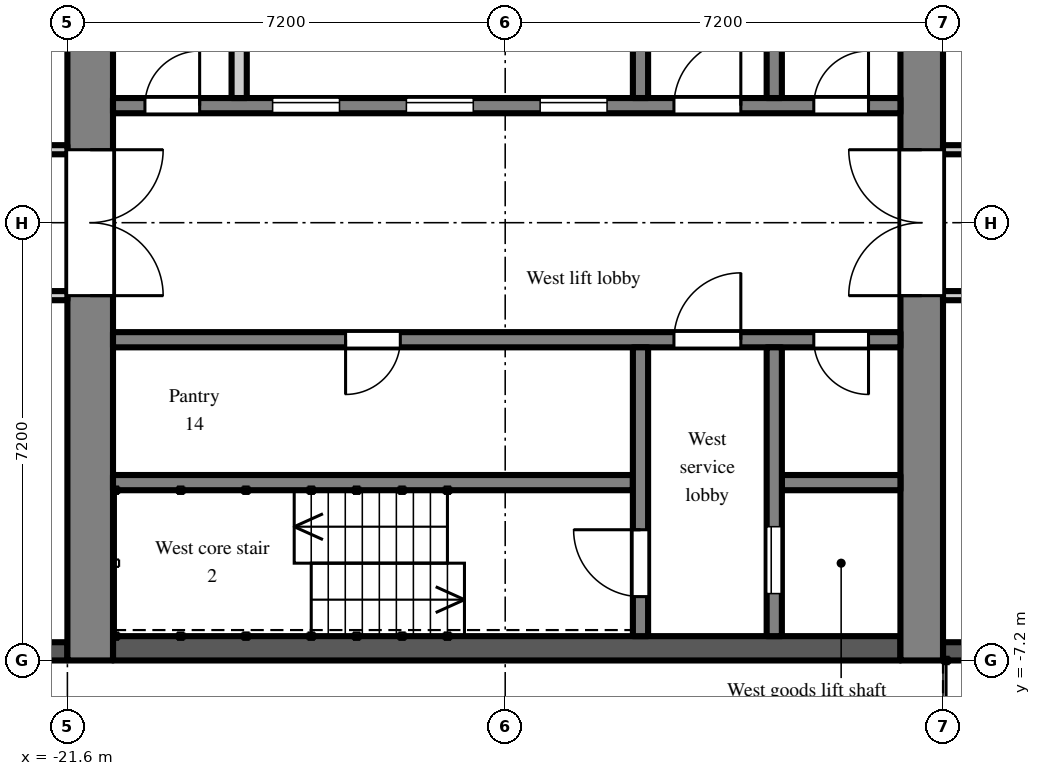
"""IFC4 building model, lengths in metres.
Left out: names, types, materials, properties, quantities, classifications, styles, units other than length and angle.
Written with IfcOpenShell. Run it as: python <this file> out.ifc"""

import sys

from ifc_helpers import new_model, si_unit, direction, frame, frame_2d, origin, place, context, subcontext, project, spatial, rectangle, extrude, element, fill, save


model = new_model("IFC4")
c1 = context("Model", 3, precision=1e-05, world=origin(), true_north=direction((0.0, 1.0)))
c2 = subcontext(c1, "Body", "Model", "MODEL_VIEW")
j1 = project(units=[si_unit("LENGTHUNIT", "METRE"), si_unit("PLANEANGLEUNIT", "RADIAN")], contexts=[c1])
p1 = place(None, origin())
s1 = spatial("IfcSite", under=j1, at=p1, CompositionType="ELEMENT")
p2 = place(p1, origin())
s2 = spatial("IfcBuilding", under=s1, at=p2, CompositionType="ELEMENT")
p3 = place(p2, frame((0.0, 0.0, 191.7)))
s3 = spatial("IfcBuildingStorey", under=s2, at=p3, CompositionType="ELEMENT", Elevation=191.7)
p4 = place(p3, frame((-24.3, -7.05, 0.0), z_axis=(0.0, 0.0, 1.0), x_axis=(1.0, 0.0, 0.0)))
e1 = element("IfcWall", 1, at=p4, inside=s3, PredefinedType="SOLIDWALL", context=c2, shape_type="SweptSolid", body=[
    extrude(rectangle(XDim=2.7, YDim=0.3, at=frame_2d((1.35, 0.0))), origin(), (0.0, 0.0, 1.0), 2.3),
])
p5 = place(p4, frame((0.75, 0.0, 0.2)))
e2 = element("IfcOpeningElement", 2, at=p5, cuts=e1, PredefinedType="OPENING", context=c2, shape_type="SweptSolid", body=[
    extrude(rectangle(XDim=1.2, YDim=1.85, at=frame_2d((0.6, 0.925))), frame((0.0, 0.16, 0.0), z_axis=(0.0, -1.0, 0.0), x_axis=(1.0, 0.0, 0.0)), (0.0, 0.0, 1.0), 0.32),
])
p6 = place(p3, frame((-7.2, -7.05, 0.0), z_axis=(0.0, 0.0, 1.0), x_axis=(1.0, 0.0, 0.0)))
e3 = element("IfcWall", 3, at=p6, inside=s3, PredefinedType="SOLIDWALL", context=c2, shape_type="SweptSolid", body=[
    extrude(rectangle(XDim=3.0, YDim=0.3, at=frame_2d((1.5, 0.0))), origin(), (0.0, 0.0, 1.0), 2.55),
])
p7 = place(p3, frame((-7.55, -7.2, 0.0), z_axis=(0.0, 0.0, 1.0), x_axis=(0.0, 1.0, 0.0)))
e4 = element("IfcWall", 4, at=p7, inside=s3, PredefinedType="SHEAR", context=c2, shape_type="SweptSolid", body=[
    extrude(rectangle(XDim=14.4, YDim=0.7, at=frame_2d((7.2, 0.0))), origin(), (0.0, 0.0, 1.0), 2.55),
])
p8 = place(p7, frame((6.0, 0.0, 0.0)))
e5 = element("IfcOpeningElement", 5, at=p8, cuts=e4, PredefinedType="OPENING", context=c2, shape_type="SweptSolid", body=[
    extrude(rectangle(XDim=2.4, YDim=2.2, at=frame_2d((1.2, 1.1))), frame((0.0, 0.36, 0.0), z_axis=(0.0, -1.0, 0.0), x_axis=(1.0, 0.0, 0.0)), (0.0, 0.0, 1.0), 0.72),
])
p9 = place(p3, frame((-21.225, -7.2, 0.0), z_axis=(0.0, 0.0, 1.0), x_axis=(0.0, 1.0, 0.0)))
e6 = element("IfcWall", 6, at=p9, inside=s3, PredefinedType="SHEAR", context=c2, shape_type="SweptSolid", body=[
    extrude(rectangle(XDim=14.4, YDim=0.75, at=frame_2d((7.2, 0.0))), origin(), (0.0, 0.0, 1.0), 2.55),
])
p10 = place(p9, frame((6.0, 0.0, 0.0)))
e7 = element("IfcOpeningElement", 7, at=p10, cuts=e6, PredefinedType="OPENING", context=c2, shape_type="SweptSolid", body=[
    extrude(rectangle(XDim=2.4, YDim=2.2, at=frame_2d((1.2, 1.1))), frame((0.0, 0.385, 0.0), z_axis=(0.0, -1.0, 0.0), x_axis=(1.0, 0.0, 0.0)), (0.0, 0.0, 1.0), 0.77),
])
p11 = place(p3, frame((-7.9, 1.925, 0.0), z_axis=(0.0, 0.0, 1.0), x_axis=(-1.0, 0.0, 0.0)))
e8 = element("IfcWall", 8, at=p11, inside=s3, PredefinedType="SHEAR", context=c2, shape_type="SweptSolid", body=[
    extrude(rectangle(XDim=12.95, YDim=0.25, at=frame_2d((6.475, 0.0))), origin(), (0.0, 0.0, 1.0), 2.55),
])
p12 = place(p11, frame((4.825, 0.0, 0.0)))
e9 = element("IfcOpeningElement", 9, at=p12, cuts=e8, PredefinedType="OPENING", context=c2, shape_type="SweptSolid", body=[
    extrude(rectangle(XDim=1.1, YDim=2.1, at=frame_2d((0.55, 1.05))), frame((0.0, 0.135, 0.0), z_axis=(0.0, -1.0, 0.0), x_axis=(1.0, 0.0, 0.0)), (0.0, 0.0, 1.0), 0.27),
])
p13 = place(p11, frame((7.025, 0.0, 0.0)))
e10 = element("IfcOpeningElement", 10, at=p13, cuts=e8, PredefinedType="OPENING", context=c2, shape_type="SweptSolid", body=[
    extrude(rectangle(XDim=1.1, YDim=2.1, at=frame_2d((0.55, 1.05))), frame((0.0, 0.135, 0.0), z_axis=(0.0, -1.0, 0.0), x_axis=(1.0, 0.0, 0.0)), (0.0, 0.0, 1.0), 0.27),
])
p14 = place(p11, frame((9.225, 0.0, 0.0)))
e11 = element("IfcOpeningElement", 11, at=p14, cuts=e8, PredefinedType="OPENING", context=c2, shape_type="SweptSolid", body=[
    extrude(rectangle(XDim=1.1, YDim=2.1, at=frame_2d((0.55, 1.05))), frame((0.0, 0.135, 0.0), z_axis=(0.0, -1.0, 0.0), x_axis=(1.0, 0.0, 0.0)), (0.0, 0.0, 1.0), 0.27),
])
p15 = place(p11, frame((0.525, 0.0, 0.0)))
e12 = element("IfcOpeningElement", 12, at=p15, cuts=e8, PredefinedType="OPENING", context=c2, shape_type="SweptSolid", body=[
    extrude(rectangle(XDim=0.9, YDim=2.1, at=frame_2d((0.45, 1.05))), frame((0.0, 0.135, 0.0), z_axis=(0.0, -1.0, 0.0), x_axis=(1.0, 0.0, 0.0)), (0.0, 0.0, 1.0), 0.27),
])
p16 = place(p11, frame((2.625, 0.0, 0.0)))
e13 = element("IfcOpeningElement", 13, at=p16, cuts=e8, PredefinedType="OPENING", context=c2, shape_type="SweptSolid", body=[
    extrude(rectangle(XDim=1.1, YDim=2.1, at=frame_2d((0.55, 1.05))), frame((0.0, 0.135, 0.0), z_axis=(0.0, -1.0, 0.0), x_axis=(1.0, 0.0, 0.0)), (0.0, 0.0, 1.0), 0.27),
])
p17 = place(p11, frame((11.525, 0.0, 0.0)))
e14 = element("IfcOpeningElement", 14, at=p17, cuts=e8, PredefinedType="OPENING", context=c2, shape_type="SweptSolid", body=[
    extrude(rectangle(XDim=0.9, YDim=2.1, at=frame_2d((0.45, 1.05))), frame((0.0, 0.135, 0.0), z_axis=(0.0, -1.0, 0.0), x_axis=(1.0, 0.0, 0.0)), (0.0, 0.0, 1.0), 0.27),
])
p18 = place(p3, frame((-9.975, 2.05, 0.0), z_axis=(0.0, 0.0, 1.0), x_axis=(0.0, 1.0, 0.0)))
e15 = element("IfcWall", 15, at=p18, inside=s3, PredefinedType="SHEAR", context=c2, shape_type="SweptSolid", body=[
    extrude(rectangle(XDim=4.75, YDim=0.25, at=frame_2d((2.375, 0.0))), origin(), (0.0, 0.0, 1.0), 2.55),
])
p19 = place(p18, frame((2.95, 0.0, 0.0)))
e16 = element("IfcOpeningElement", 16, at=p19, cuts=e15, PredefinedType="OPENING", context=c2, shape_type="SweptSolid", body=[
    extrude(rectangle(XDim=1.1, YDim=2.1, at=frame_2d((0.55, 1.05))), frame((0.0, 0.135, 0.0), z_axis=(0.0, -1.0, 0.0), x_axis=(1.0, 0.0, 0.0)), (0.0, 0.0, 1.0), 0.27),
])
p20 = place(p3, frame((-12.175, 2.05, 0.0), z_axis=(0.0, 0.0, 1.0), x_axis=(0.0, 1.0, 0.0)))
e17 = element("IfcWall", 17, at=p20, inside=s3, PredefinedType="SHEAR", context=c2, shape_type="SweptSolid", body=[
    extrude(rectangle(XDim=4.75, YDim=0.25, at=frame_2d((2.375, 0.0))), origin(), (0.0, 0.0, 1.0), 2.55),
])
p21 = place(p20, frame((3.0, 0.0, 0.0)))
e18 = element("IfcOpeningElement", 18, at=p21, cuts=e17, PredefinedType="OPENING", context=c2, shape_type="SweptSolid", body=[
    extrude(rectangle(XDim=1.1, YDim=2.1, at=frame_2d((0.55, 1.05))), frame((0.0, 0.135, 0.0), z_axis=(0.0, -1.0, 0.0), x_axis=(1.0, 0.0, 0.0)), (0.0, 0.0, 1.0), 0.27),
])
p22 = place(p3, frame((-18.775, 2.05, 0.0), z_axis=(0.0, 0.0, 1.0), x_axis=(0.0, 1.0, 0.0)))
e19 = element("IfcWall", 19, at=p22, inside=s3, PredefinedType="PARTITIONING", context=c2, shape_type="SweptSolid", body=[
    extrude(rectangle(XDim=2.1, YDim=0.25, at=frame_2d((1.05, 0.0))), origin(), (0.0, 0.0, 1.0), 2.55),
])
p23 = place(p3, frame((-7.9, -7.0, 0.0), z_axis=(0.0, 0.0, 1.0), x_axis=(-1.0, 0.0, 0.0)))
e20 = element("IfcWall", 20, at=p23, inside=s3, PredefinedType="SHEAR", context=c2, shape_type="SweptSolid", body=[
    extrude(rectangle(XDim=12.95, YDim=0.4, at=frame_2d((6.475, 0.0))), origin(), (0.0, 0.0, 1.0), 2.55),
])
p24 = place(p3, frame((-7.9, -1.925, 0.0), z_axis=(0.0, 0.0, 1.0), x_axis=(-1.0, 0.0, 0.0)))
e21 = element("IfcWall", 21, at=p24, inside=s3, PredefinedType="SHEAR", context=c2, shape_type="SweptSolid", body=[
    extrude(rectangle(XDim=12.95, YDim=0.25, at=frame_2d((6.475, 0.0))), origin(), (0.0, 0.0, 1.0), 2.55),
])
p25 = place(p24, frame((0.525, 0.0, 0.0)))
e22 = element("IfcOpeningElement", 22, at=p25, cuts=e21, PredefinedType="OPENING", context=c2, shape_type="SweptSolid", body=[
    extrude(rectangle(XDim=0.9, YDim=2.1, at=frame_2d((0.45, 1.05))), frame((0.0, 0.135, 0.0), z_axis=(0.0, -1.0, 0.0), x_axis=(1.0, 0.0, 0.0)), (0.0, 0.0, 1.0), 0.27),
])
p26 = place(p24, frame((2.625, 0.0, 0.0)))
e23 = element("IfcOpeningElement", 23, at=p26, cuts=e21, PredefinedType="OPENING", context=c2, shape_type="SweptSolid", body=[
    extrude(rectangle(XDim=1.1, YDim=2.1, at=frame_2d((0.55, 1.05))), frame((0.0, 0.135, 0.0), z_axis=(0.0, -1.0, 0.0), x_axis=(1.0, 0.0, 0.0)), (0.0, 0.0, 1.0), 0.27),
])
p27 = place(p24, frame((8.225, 0.0, 0.0)))
e24 = element("IfcOpeningElement", 24, at=p27, cuts=e21, PredefinedType="OPENING", context=c2, shape_type="SweptSolid", body=[
    extrude(rectangle(XDim=0.9, YDim=2.1, at=frame_2d((0.45, 1.05))), frame((0.0, 0.135, 0.0), z_axis=(0.0, -1.0, 0.0), x_axis=(1.0, 0.0, 0.0)), (0.0, 0.0, 1.0), 0.27),
])
p28 = place(p3, frame((-7.9, -4.275, 0.0), z_axis=(0.0, 0.0, 1.0), x_axis=(-1.0, 0.0, 0.0)))
e25 = element("IfcWall", 25, at=p28, inside=s3, PredefinedType="SHEAR", context=c2, shape_type="SweptSolid", body=[
    extrude(rectangle(XDim=1.95, YDim=0.25, at=frame_2d((0.975, 0.0))), origin(), (0.0, 0.0, 1.0), 2.55),
])
p29 = place(p3, frame((-12.3, -4.275, 0.0), z_axis=(0.0, 0.0, 1.0), x_axis=(-1.0, 0.0, 0.0)))
e26 = element("IfcWall", 26, at=p29, inside=s3, PredefinedType="SHEAR", context=c2, shape_type="SweptSolid", body=[
    extrude(rectangle(XDim=8.55, YDim=0.25, at=frame_2d((4.275, 0.0))), origin(), (0.0, 0.0, 1.0), 2.55),
])
p30 = place(p3, frame((-9.975, -2.05, 0.0), z_axis=(0.0, 0.0, 1.0), x_axis=(0.0, -1.0, 0.0)))
e27 = element("IfcWall", 27, at=p30, inside=s3, PredefinedType="SHEAR", context=c2, shape_type="SweptSolid", body=[
    extrude(rectangle(XDim=4.75, YDim=0.25, at=frame_2d((2.375, 0.0))), origin(), (0.0, 0.0, 1.0), 2.55),
])
p31 = place(p30, frame((2.95, 0.0, 0.0)))
e28 = element("IfcOpeningElement", 28, at=p31, cuts=e27, PredefinedType="OPENING", context=c2, shape_type="SweptSolid", body=[
    extrude(rectangle(XDim=1.1, YDim=2.1, at=frame_2d((0.55, 1.05))), frame((0.0, 0.135, 0.0), z_axis=(0.0, -1.0, 0.0), x_axis=(1.0, 0.0, 0.0)), (0.0, 0.0, 1.0), 0.27),
])
p32 = place(p3, frame((-12.175, -2.05, 0.0), z_axis=(0.0, 0.0, 1.0), x_axis=(0.0, -1.0, 0.0)))
e29 = element("IfcWall", 29, at=p32, inside=s3, PredefinedType="SHEAR", context=c2, shape_type="SweptSolid", body=[
    extrude(rectangle(XDim=4.75, YDim=0.25, at=frame_2d((2.375, 0.0))), origin(), (0.0, 0.0, 1.0), 2.55),
])
p33 = place(p32, frame((3.0, 0.0, 0.0)))
e30 = element("IfcOpeningElement", 30, at=p33, cuts=e29, PredefinedType="OPENING", context=c2, shape_type="SweptSolid", body=[
    extrude(rectangle(XDim=1.1, YDim=2.1, at=frame_2d((0.55, 1.05))), frame((0.0, 0.135, 0.0), z_axis=(0.0, -1.0, 0.0), x_axis=(1.0, 0.0, 0.0)), (0.0, 0.0, 1.0), 0.27),
])
p34 = place(p3, frame((-36.5, -1.2, 0.0), z_axis=(0.0, 0.0, 1.0), x_axis=(1.0, 0.0, 0.0)))
e31 = element("IfcWall", 31, at=p34, inside=s3, PredefinedType="PARTITIONING", context=c2, shape_type="SweptSolid", body=[
    extrude(rectangle(XDim=14.9, YDim=0.15, at=frame_2d((7.45, 0.0))), origin(), (0.0, 0.0, 1.0), 2.55),
])
p35 = place(p34, frame((12.65, 0.0, 0.0)))
e32 = element("IfcOpeningElement", 32, at=p35, cuts=e31, PredefinedType="OPENING", context=c2, shape_type="SweptSolid", body=[
    extrude(rectangle(XDim=0.9, YDim=2.1, at=frame_2d((0.45, 1.05))), frame((0.0, 0.085, 0.0), z_axis=(0.0, -1.0, 0.0), x_axis=(1.0, 0.0, 0.0)), (0.0, 0.0, 1.0), 0.17),
])
p36 = place(p34, frame((9.05, 0.0, 0.0)))
e33 = element("IfcOpeningElement", 33, at=p36, cuts=e31, PredefinedType="OPENING", context=c2, shape_type="SweptSolid", body=[
    extrude(rectangle(XDim=0.9, YDim=2.1, at=frame_2d((0.45, 1.05))), frame((0.0, 0.085, 0.0), z_axis=(0.0, -1.0, 0.0), x_axis=(1.0, 0.0, 0.0)), (0.0, 0.0, 1.0), 0.17),
])
p37 = place(p34, frame((5.45, 0.0, 0.0)))
e34 = element("IfcOpeningElement", 34, at=p37, cuts=e31, PredefinedType="OPENING", context=c2, shape_type="SweptSolid", body=[
    extrude(rectangle(XDim=0.9, YDim=2.1, at=frame_2d((0.45, 1.05))), frame((0.0, 0.085, 0.0), z_axis=(0.0, -1.0, 0.0), x_axis=(1.0, 0.0, 0.0)), (0.0, 0.0, 1.0), 0.17),
])
p38 = place(p34, frame((1.15, 0.0, 0.0)))
e35 = element("IfcOpeningElement", 35, at=p38, cuts=e31, PredefinedType="OPENING", context=c2, shape_type="SweptSolid", body=[
    extrude(rectangle(XDim=1.8, YDim=2.1, at=frame_2d((0.9, 1.05))), frame((0.0, 0.085, 0.0), z_axis=(0.0, -1.0, 0.0), x_axis=(1.0, 0.0, 0.0)), (0.0, 0.0, 1.0), 0.17),
])
p39 = place(p3, frame((-36.5, 1.2, 0.0), z_axis=(0.0, 0.0, 1.0), x_axis=(1.0, 0.0, 0.0)))
e36 = element("IfcWall", 36, at=p39, inside=s3, PredefinedType="PARTITIONING", context=c2, shape_type="SweptSolid", body=[
    extrude(rectangle(XDim=14.9, YDim=0.15, at=frame_2d((7.45, 0.0))), origin(), (0.0, 0.0, 1.0), 2.55),
])
p40 = place(p39, frame((10.1, 0.0, 0.0)))
e37 = element("IfcOpeningElement", 37, at=p40, cuts=e36, PredefinedType="OPENING", context=c2, shape_type="SweptSolid", body=[
    extrude(rectangle(XDim=1.0, YDim=2.1, at=frame_2d((0.5, 1.05))), frame((0.0, 0.085, 0.0), z_axis=(0.0, -1.0, 0.0), x_axis=(1.0, 0.0, 0.0)), (0.0, 0.0, 1.0), 0.17),
])
p41 = place(p39, frame((4.7, 0.0, 0.0)))
e38 = element("IfcOpeningElement", 38, at=p41, cuts=e36, PredefinedType="OPENING", context=c2, shape_type="SweptSolid", body=[
    extrude(rectangle(XDim=1.0, YDim=2.1, at=frame_2d((0.5, 1.05))), frame((0.0, 0.085, 0.0), z_axis=(0.0, -1.0, 0.0), x_axis=(1.0, 0.0, 0.0)), (0.0, 0.0, 1.0), 0.17),
])
p42 = place(p39, frame((1.15, 0.0, 0.0)))
e39 = element("IfcOpeningElement", 39, at=p42, cuts=e36, PredefinedType="OPENING", context=c2, shape_type="SweptSolid", body=[
    extrude(rectangle(XDim=1.8, YDim=2.1, at=frame_2d((0.9, 1.05))), frame((0.0, 0.085, 0.0), z_axis=(0.0, -1.0, 0.0), x_axis=(1.0, 0.0, 0.0)), (0.0, 0.0, 1.0), 0.17),
])
p43 = place(p3, frame((-7.2, -1.2, 0.0), z_axis=(0.0, 0.0, 1.0), x_axis=(1.0, 0.0, 0.0)))
e40 = element("IfcWall", 40, at=p43, inside=s3, PredefinedType="PARTITIONING", context=c2, shape_type="SweptSolid", body=[
    extrude(rectangle(XDim=6.075, YDim=0.15, at=frame_2d((3.038, 0.0))), origin(), (0.0, 0.0, 1.0), 2.55),
])
p44 = place(p43, frame((2.55, 0.0, 0.0)))
e41 = element("IfcOpeningElement", 41, at=p44, cuts=e40, PredefinedType="OPENING", context=c2, shape_type="SweptSolid", body=[
    extrude(rectangle(XDim=0.9, YDim=2.1, at=frame_2d((0.45, 1.05))), frame((0.0, 0.085, 0.0), z_axis=(0.0, -1.0, 0.0), x_axis=(1.0, 0.0, 0.0)), (0.0, 0.0, 1.0), 0.17),
])
p45 = place(p3, frame((-7.2, 1.2, 0.0), z_axis=(0.0, 0.0, 1.0), x_axis=(1.0, 0.0, 0.0)))
e42 = element("IfcWall", 42, at=p45, inside=s3, PredefinedType="PARTITIONING", context=c2, shape_type="SweptSolid", body=[
    extrude(rectangle(XDim=6.075, YDim=0.15, at=frame_2d((3.038, 0.0))), origin(), (0.0, 0.0, 1.0), 2.55),
])
p46 = place(p45, frame((0.55, 0.0, 0.0)))
e43 = element("IfcOpeningElement", 43, at=p46, cuts=e42, PredefinedType="OPENING", context=c2, shape_type="SweptSolid", body=[
    extrude(rectangle(XDim=0.9, YDim=2.1, at=frame_2d((0.45, 1.05))), frame((0.0, 0.085, 0.0), z_axis=(0.0, -1.0, 0.0), x_axis=(1.0, 0.0, 0.0)), (0.0, 0.0, 1.0), 0.17),
])
p47 = place(p12, origin())
e44 = element("IfcDoor", 44, at=p47, inside=s3, OperationType="SLIDING_TO_LEFT", PredefinedType="DOOR", context=c2, shape_type="SweptSolid", body=[
    extrude(rectangle(XDim=1.1, YDim=2.1, at=frame_2d((0.55, 1.05))), frame((0.0, 0.025, 0.0), z_axis=(0.0, -1.0, 0.0), x_axis=(1.0, 0.0, 0.0)), (0.0, 0.0, 1.0), 0.05),
])
fill(e9, e44)
p48 = place(p13, origin())
e45 = element("IfcDoor", 45, at=p48, inside=s3, OperationType="SLIDING_TO_LEFT", PredefinedType="DOOR", context=c2, shape_type="SweptSolid", body=[
    extrude(rectangle(XDim=1.1, YDim=2.1, at=frame_2d((0.55, 1.05))), frame((0.0, 0.025, 0.0), z_axis=(0.0, -1.0, 0.0), x_axis=(1.0, 0.0, 0.0)), (0.0, 0.0, 1.0), 0.05),
])
fill(e10, e45)
p49 = place(p14, origin())
e46 = element("IfcDoor", 46, at=p49, inside=s3, OperationType="SLIDING_TO_LEFT", PredefinedType="DOOR", context=c2, shape_type="SweptSolid", body=[
    extrude(rectangle(XDim=1.1, YDim=2.1, at=frame_2d((0.55, 1.05))), frame((0.0, 0.025, 0.0), z_axis=(0.0, -1.0, 0.0), x_axis=(1.0, 0.0, 0.0)), (0.0, 0.0, 1.0), 0.05),
])
fill(e11, e46)
p50 = place(p31, origin())
e47 = element("IfcDoor", 47, at=p50, inside=s3, OperationType="SLIDING_TO_LEFT", PredefinedType="DOOR", context=c2, shape_type="SweptSolid", body=[
    extrude(rectangle(XDim=1.1, YDim=2.1, at=frame_2d((0.55, 1.05))), frame((0.0, 0.025, 0.0), z_axis=(0.0, -1.0, 0.0), x_axis=(1.0, 0.0, 0.0)), (0.0, 0.0, 1.0), 0.05),
])
fill(e28, e47)
p51 = place(p33, frame((1.1, 0.0, 0.0), z_axis=(0.0, 0.0, 1.0), x_axis=(-1.0, 0.0, 0.0)))
e48 = element("IfcDoor", 48, at=p51, inside=s3, OperationType="SINGLE_SWING_RIGHT", PredefinedType="DOOR", context=c2, shape_type="SweptSolid", body=[
    extrude(rectangle(XDim=1.1, YDim=2.1, at=frame_2d((0.55, 1.05))), frame((0.0, 0.025, 0.0), z_axis=(0.0, -1.0, 0.0), x_axis=(1.0, 0.0, 0.0)), (0.0, 0.0, 1.0), 0.05),
])
fill(e30, e48)
p52 = place(p15, frame((0.9, 0.0, 0.0), z_axis=(0.0, 0.0, 1.0), x_axis=(-1.0, 0.0, 0.0)))
e49 = element("IfcDoor", 49, at=p52, inside=s3, OperationType="SINGLE_SWING_RIGHT", PredefinedType="DOOR", context=c2, shape_type="SweptSolid", body=[
    extrude(rectangle(XDim=0.9, YDim=2.1, at=frame_2d((0.45, 1.05))), frame((0.0, 0.025, 0.0), z_axis=(0.0, -1.0, 0.0), x_axis=(1.0, 0.0, 0.0)), (0.0, 0.0, 1.0), 0.05),
])
fill(e12, e49)
p53 = place(p25, origin())
e50 = element("IfcDoor", 50, at=p53, inside=s3, OperationType="SINGLE_SWING_LEFT", PredefinedType="DOOR", context=c2, shape_type="SweptSolid", body=[
    extrude(rectangle(XDim=0.9, YDim=2.1, at=frame_2d((0.45, 1.05))), frame((0.0, 0.025, 0.0), z_axis=(0.0, -1.0, 0.0), x_axis=(1.0, 0.0, 0.0)), (0.0, 0.0, 1.0), 0.05),
])
fill(e22, e50)
p54 = place(p16, frame((1.1, 0.0, 0.0), z_axis=(0.0, 0.0, 1.0), x_axis=(-1.0, 0.0, 0.0)))
e51 = element("IfcDoor", 51, at=p54, inside=s3, OperationType="SINGLE_SWING_RIGHT", PredefinedType="DOOR", context=c2, shape_type="SweptSolid", body=[
    extrude(rectangle(XDim=1.1, YDim=2.1, at=frame_2d((0.55, 1.05))), frame((0.0, 0.025, 0.0), z_axis=(0.0, -1.0, 0.0), x_axis=(1.0, 0.0, 0.0)), (0.0, 0.0, 1.0), 0.05),
])
fill(e13, e51)
p55 = place(p26, frame((1.1, 0.0, 0.0), z_axis=(0.0, 0.0, 1.0), x_axis=(-1.0, 0.0, 0.0)))
e52 = element("IfcDoor", 52, at=p55, inside=s3, OperationType="SINGLE_SWING_RIGHT", PredefinedType="DOOR", context=c2, shape_type="SweptSolid", body=[
    extrude(rectangle(XDim=1.1, YDim=2.1, at=frame_2d((0.55, 1.05))), frame((0.0, 0.025, 0.0), z_axis=(0.0, -1.0, 0.0), x_axis=(1.0, 0.0, 0.0)), (0.0, 0.0, 1.0), 0.05),
])
fill(e23, e52)
p56 = place(p8, origin())
e53 = element("IfcDoor", 53, at=p56, inside=s3, OperationType="DOUBLE_DOOR_DOUBLE_SWING", PredefinedType="DOOR", context=c2, shape_type="SweptSolid", body=[
    extrude(rectangle(XDim=2.4, YDim=2.2, at=frame_2d((1.2, 1.1))), frame((0.0, 0.025, 0.0), z_axis=(0.0, -1.0, 0.0), x_axis=(1.0, 0.0, 0.0)), (0.0, 0.0, 1.0), 0.05),
])
fill(e5, e53)
p57 = place(p10, frame((2.4, 0.0, 0.0), z_axis=(0.0, 0.0, 1.0), x_axis=(-1.0, 0.0, 0.0)))
e54 = element("IfcDoor", 54, at=p57, inside=s3, OperationType="DOUBLE_DOOR_DOUBLE_SWING", PredefinedType="DOOR", context=c2, shape_type="SweptSolid", body=[
    extrude(rectangle(XDim=2.4, YDim=2.2, at=frame_2d((1.2, 1.1))), frame((0.0, 0.025, 0.0), z_axis=(0.0, -1.0, 0.0), x_axis=(1.0, 0.0, 0.0)), (0.0, 0.0, 1.0), 0.05),
])
fill(e7, e54)
p58 = place(p17, frame((0.9, 0.0, 0.0), z_axis=(0.0, 0.0, 1.0), x_axis=(-1.0, 0.0, 0.0)))
e55 = element("IfcDoor", 55, at=p58, inside=s3, OperationType="SINGLE_SWING_RIGHT", PredefinedType="DOOR", context=c2, shape_type="SweptSolid", body=[
    extrude(rectangle(XDim=0.9, YDim=2.1, at=frame_2d((0.45, 1.05))), frame((0.0, 0.025, 0.0), z_axis=(0.0, -1.0, 0.0), x_axis=(1.0, 0.0, 0.0)), (0.0, 0.0, 1.0), 0.05),
])
fill(e14, e55)
p59 = place(p27, origin())
e56 = element("IfcDoor", 56, at=p59, inside=s3, OperationType="SINGLE_SWING_RIGHT", PredefinedType="DOOR", context=c2, shape_type="SweptSolid", body=[
    extrude(rectangle(XDim=0.9, YDim=2.1, at=frame_2d((0.45, 1.05))), frame((0.0, 0.025, 0.0), z_axis=(0.0, -1.0, 0.0), x_axis=(1.0, 0.0, 0.0)), (0.0, 0.0, 1.0), 0.05),
])
fill(e24, e56)
save(model, sys.argv[1])
